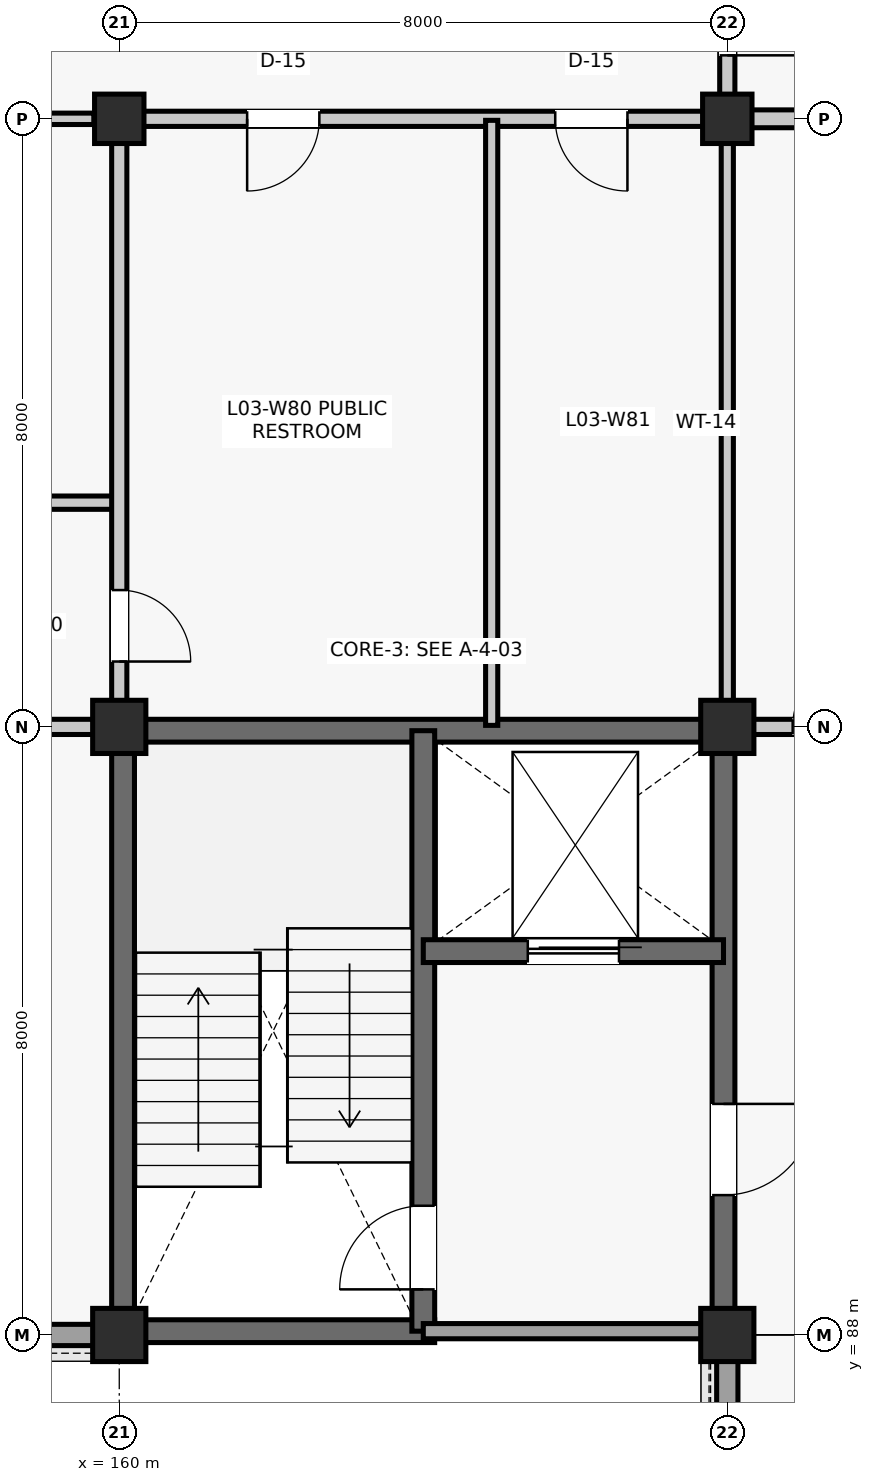
"""IFC4 building model, lengths in metres.
Left out: names, types, materials, properties, quantities, classifications, styles, units other than length and angle.
Written with IfcOpenShell. Run it as: python <this file> out.ifc"""

import sys

from ifc_helpers import new_model, si_unit, direction, frame, frame_2d, origin, origin_2d, place, context, subcontext, project, spatial, rectangle, extrude, element, fill, save


model = new_model("IFC4")
c1 = context("Model", 3, precision=1e-05, world=origin(), true_north=direction((0.0, 1.0)))
c2 = subcontext(c1, "Body", "Model", "MODEL_VIEW")
j1 = project(units=[si_unit("LENGTHUNIT", "METRE"), si_unit("PLANEANGLEUNIT", "RADIAN")], contexts=[c1])
p1 = place(None, origin())
s1 = spatial("IfcSite", under=j1, at=p1, CompositionType="ELEMENT")
p2 = place(p1, origin())
s2 = spatial("IfcBuilding", under=s1, at=p2, CompositionType="ELEMENT")
p3 = place(p2, frame((0.0, 0.0, 13.86)))
s3 = spatial("IfcBuildingStorey", under=s2, at=p3, CompositionType="ELEMENT", Elevation=13.86)
for number, where, z_axis, x_axis in (
    (1, (160.0, 88.0, 0.0), (0.0, 0.0, 1.0), (1.0, 0.0, 0.0)),
    (2, (160.0, 96.0, 0.0), (0.0, 0.0, 1.0), (1.0, 0.0, 0.0)),
):
    element("IfcColumn", number, at=place(p3, frame(where, z_axis=z_axis, x_axis=x_axis)), inside=s3, PredefinedType="COLUMN", context=c2, shape_type="SweptSolid", body=[
        extrude(rectangle(XDim=0.7, YDim=0.7, at=origin_2d()), origin(), (0.0, 0.0, 1.0), 3.96),
    ])
p4 = place(p3, frame((160.0, 104.0, 0.0), z_axis=(0.0, 0.0, 1.0), x_axis=(1.0, 0.0, 0.0)))
e3 = element("IfcColumn", 3, at=p4, inside=s3, PredefinedType="COLUMN", context=c2, shape_type="SweptSolid", body=[
    extrude(rectangle(XDim=0.65, YDim=0.65, at=origin_2d()), origin(), (0.0, 0.0, 1.0), 3.96),
])
for number, where, z_axis, x_axis in (
    (4, (168.0, 88.0, 0.0), (0.0, 0.0, 1.0), (1.0, 0.0, 0.0)),
    (5, (168.0, 96.0, 0.0), (0.0, 0.0, 1.0), (1.0, 0.0, 0.0)),
):
    element("IfcColumn", number, at=place(p3, frame(where, z_axis=z_axis, x_axis=x_axis)), inside=s3, PredefinedType="COLUMN", context=c2, shape_type="SweptSolid", body=[
        extrude(rectangle(XDim=0.7, YDim=0.7, at=origin_2d()), origin(), (0.0, 0.0, 1.0), 3.96),
    ])
p5 = place(p3, frame((168.0, 104.0, 0.0), z_axis=(0.0, 0.0, 1.0), x_axis=(1.0, 0.0, 0.0)))
e6 = element("IfcColumn", 6, at=p5, inside=s3, PredefinedType="COLUMN", context=c2, shape_type="SweptSolid", body=[
    extrude(rectangle(XDim=0.65, YDim=0.65, at=origin_2d()), origin(), (0.0, 0.0, 1.0), 3.96),
])
p6 = place(p3, frame((152.31, 88.0, 0.0), z_axis=(0.0, 0.0, 1.0), x_axis=(1.0, 0.0, 0.0)))
e7 = element("IfcWall", 7, at=p6, inside=s3, PredefinedType="SOLIDWALL", context=c2, shape_type="SweptSolid", body=[
    extrude(rectangle(XDim=7.355, YDim=0.28, at=frame_2d((3.677, 0.0))), origin(), (0.0, 0.0, 1.0), 3.364),
])
p7 = place(p6, frame((2.577, 0.0, 1.35)))
e8 = element("IfcOpeningElement", 8, at=p7, cuts=e7, PredefinedType="OPENING", context=c2, shape_type="SweptSolid", body=[
    extrude(rectangle(XDim=2.2, YDim=1.3, at=frame_2d((1.1, 0.65))), frame((0.0, 0.15, 0.0), z_axis=(0.0, -1.0, 0.0), x_axis=(1.0, 0.0, 0.0)), (0.0, 0.0, 1.0), 0.3),
])
p8 = place(p3, frame((168.0, 80.31, 0.0), z_axis=(0.0, 0.0, 1.0), x_axis=(0.0, 1.0, 0.0)))
e9 = element("IfcWall", 9, at=p8, inside=s3, PredefinedType="SOLIDWALL", context=c2, shape_type="SweptSolid", body=[
    extrude(rectangle(XDim=7.355, YDim=0.28, at=frame_2d((3.677, 0.0))), origin(), (0.0, 0.0, 1.0), 3.304),
])
p9 = place(p8, frame((0.749, 0.0, 0.95)))
e10 = element("IfcOpeningElement", 10, at=p9, cuts=e9, PredefinedType="OPENING", context=c2, shape_type="SweptSolid", body=[
    extrude(rectangle(XDim=1.15, YDim=1.65, at=frame_2d((0.575, 0.825))), frame((0.0, 0.15, 0.0), z_axis=(0.0, -1.0, 0.0), x_axis=(1.0, 0.0, 0.0)), (0.0, 0.0, 1.0), 0.3),
])
p10 = place(p8, frame((5.456, 0.0, 0.95)))
e11 = element("IfcOpeningElement", 11, at=p10, cuts=e9, PredefinedType="OPENING", context=c2, shape_type="SweptSolid", body=[
    extrude(rectangle(XDim=1.15, YDim=1.65, at=frame_2d((0.575, 0.825))), frame((0.0, 0.15, 0.0), z_axis=(0.0, -1.0, 0.0), x_axis=(1.0, 0.0, 0.0)), (0.0, 0.0, 1.0), 0.3),
])
for number, where, z_axis, x_axis in (
    (12, (160.05, 88.24, 0.0), (0.0, 0.0, 1.0), (0.0, 1.0, 0.0)),
    (13, (160.24, 95.95, 0.0), (0.0, 0.0, 1.0), (1.0, 0.0, 0.0)),
):
    element("IfcWall", number, at=place(p3, frame(where, z_axis=z_axis, x_axis=x_axis)), inside=s3, PredefinedType="SHEAR", context=c2, shape_type="SweptSolid", body=[
        extrude(rectangle(XDim=7.52, YDim=0.3, at=frame_2d((3.76, 0.0))), origin(), (0.0, 0.0, 1.0), 3.725),
    ])
p11 = place(p3, frame((167.95, 88.24, 0.0), z_axis=(0.0, 0.0, 1.0), x_axis=(0.0, 1.0, 0.0)))
e14 = element("IfcWall", 14, at=p11, inside=s3, PredefinedType="SHEAR", context=c2, shape_type="SweptSolid", body=[
    extrude(rectangle(XDim=7.52, YDim=0.3, at=frame_2d((3.76, 0.0))), origin(), (0.0, 0.0, 1.0), 3.725),
])
p12 = place(p11, frame((1.6, 0.0, 0.0)))
e15 = element("IfcOpeningElement", 15, at=p12, cuts=e14, PredefinedType="OPENING", context=c2, shape_type="SweptSolid", body=[
    extrude(rectangle(XDim=1.2, YDim=2.15, at=frame_2d((0.6, 1.075))), frame((0.0, 0.16, 0.0), z_axis=(0.0, -1.0, 0.0), x_axis=(1.0, 0.0, 0.0)), (0.0, 0.0, 1.0), 0.32),
])
p13 = place(p3, frame((160.24, 88.05, 0.0), z_axis=(0.0, 0.0, 1.0), x_axis=(1.0, 0.0, 0.0)))
e16 = element("IfcWall", 16, at=p13, inside=s3, PredefinedType="SHEAR", context=c2, shape_type="SweptSolid", body=[
    extrude(rectangle(XDim=3.91, YDim=0.3, at=frame_2d((1.955, 0.0))), origin(), (0.0, 0.0, 1.0), 3.725),
])
p14 = place(p3, frame((164.0, 88.05, 0.0), z_axis=(0.0, 0.0, 1.0), x_axis=(0.0, 1.0, 0.0)))
e17 = element("IfcWall", 17, at=p14, inside=s3, PredefinedType="SHEAR", context=c2, shape_type="SweptSolid", body=[
    extrude(rectangle(XDim=7.9, YDim=0.3, at=frame_2d((3.95, 0.0))), origin(), (0.0, 0.0, 1.0), 3.725),
])
p15 = place(p14, frame((0.55, 0.0, 0.0)))
e18 = element("IfcOpeningElement", 18, at=p15, cuts=e17, PredefinedType="OPENING", context=c2, shape_type="SweptSolid", body=[
    extrude(rectangle(XDim=1.1, YDim=2.15, at=frame_2d((0.55, 1.075))), frame((0.0, 0.16, 0.0), z_axis=(0.0, -1.0, 0.0), x_axis=(1.0, 0.0, 0.0)), (0.0, 0.0, 1.0), 0.32),
])
p16 = place(p3, frame((164.0, 93.05, 0.0), z_axis=(0.0, 0.0, 1.0), x_axis=(1.0, 0.0, 0.0)))
e19 = element("IfcWall", 19, at=p16, inside=s3, PredefinedType="SHEAR", context=c2, shape_type="SweptSolid", body=[
    extrude(rectangle(XDim=3.95, YDim=0.3, at=frame_2d((1.975, 0.0))), origin(), (0.0, 0.0, 1.0), 3.725),
])
p17 = place(p16, frame((1.375, 0.0, 0.0)))
e20 = element("IfcOpeningElement", 20, at=p17, cuts=e19, PredefinedType="OPENING", context=c2, shape_type="SweptSolid", body=[
    extrude(rectangle(XDim=1.2, YDim=2.2, at=frame_2d((0.6, 1.1))), frame((0.0, 0.16, 0.0), z_axis=(0.0, -1.0, 0.0), x_axis=(1.0, 0.0, 0.0)), (0.0, 0.0, 1.0), 0.32),
])
p18 = place(p3, frame((164.0, 88.05, 0.0), z_axis=(0.0, 0.0, 1.0), x_axis=(1.0, 0.0, 0.0)))
e21 = element("IfcWall", 21, at=p18, inside=s3, PredefinedType="PARTITIONING", context=c2, shape_type="SweptSolid", body=[
    extrude(rectangle(XDim=3.66, YDim=0.2, at=frame_2d((1.83, 0.0))), origin(), (0.0, 0.0, 1.0), 3.297),
])
p19 = place(p3, frame((154.9, 98.95, 0.0), z_axis=(0.0, 0.0, 1.0), x_axis=(1.0, 0.0, 0.0)))
e22 = element("IfcWall", 22, at=p19, inside=s3, PredefinedType="PARTITIONING", context=c2, shape_type="SweptSolid", body=[
    extrude(rectangle(XDim=5.08, YDim=0.175, at=frame_2d((2.54, 0.0))), origin(), (0.0, 0.0, 1.0), 3.452),
])
p20 = place(p19, frame((2.03, 0.0, 0.0)))
e23 = element("IfcOpeningElement", 23, at=p20, cuts=e22, PredefinedType="OPENING", context=c2, shape_type="SweptSolid", body=[
    extrude(rectangle(XDim=1.02, YDim=2.2, at=frame_2d((0.51, 1.1))), frame((0.0, 0.097, 0.0), z_axis=(0.0, -1.0, 0.0), x_axis=(1.0, 0.0, 0.0)), (0.0, 0.0, 1.0), 0.195),
])
p21 = place(p3, frame((154.95, 104.0, 0.0), z_axis=(0.0, 0.0, 1.0), x_axis=(1.0, 0.0, 0.0)))
e24 = element("IfcWall", 24, at=p21, inside=s3, PredefinedType="PARTITIONING", context=c2, shape_type="SweptSolid", body=[
    extrude(rectangle(XDim=4.715, YDim=0.15, at=frame_2d((2.357, 0.0))), origin(), (0.0, 0.0, 1.0), 3.247),
])
p22 = place(p3, frame((152.315, 96.0, 0.0), z_axis=(0.0, 0.0, 1.0), x_axis=(1.0, 0.0, 0.0)))
e25 = element("IfcWall", 25, at=p22, inside=s3, PredefinedType="PARTITIONING", context=c2, shape_type="SweptSolid", body=[
    extrude(rectangle(XDim=7.345, YDim=0.2, at=frame_2d((3.672, 0.0))), origin(), (0.0, 0.0, 1.0), 3.452),
])
p23 = place(p3, frame((160.0, 96.34, 0.0), z_axis=(0.0, 0.0, 1.0), x_axis=(0.0, 1.0, 0.0)))
e26 = element("IfcWall", 26, at=p23, inside=s3, PredefinedType="PARTITIONING", context=c2, shape_type="SweptSolid", body=[
    extrude(rectangle(XDim=7.345, YDim=0.2, at=frame_2d((3.672, 0.0))), origin(), (0.0, 0.0, 1.0), 3.452),
])
p24 = place(p23, frame((0.52, 0.0, 0.0)))
e27 = element("IfcOpeningElement", 27, at=p24, cuts=e26, PredefinedType="OPENING", context=c2, shape_type="SweptSolid", body=[
    extrude(rectangle(XDim=0.94, YDim=2.12, at=frame_2d((0.47, 1.06))), frame((0.0, 0.11, 0.0), z_axis=(0.0, -1.0, 0.0), x_axis=(1.0, 0.0, 0.0)), (0.0, 0.0, 1.0), 0.22),
])
p25 = place(p3, frame((168.0, 96.34, 0.0), z_axis=(0.0, 0.0, 1.0), x_axis=(0.0, 1.0, 0.0)))
e28 = element("IfcWall", 28, at=p25, inside=s3, PredefinedType="PARTITIONING", context=c2, shape_type="SweptSolid", body=[
    extrude(rectangle(XDim=7.345, YDim=0.16, at=frame_2d((3.672, 0.0))), origin(), (0.0, 0.0, 1.0), 3.247),
])
p26 = place(p3, frame((160.315, 104.0, 0.0), z_axis=(0.0, 0.0, 1.0), x_axis=(1.0, 0.0, 0.0)))
e29 = element("IfcWall", 29, at=p26, inside=s3, PredefinedType="PARTITIONING", context=c2, shape_type="SweptSolid", body=[
    extrude(rectangle(XDim=7.37, YDim=0.2, at=frame_2d((3.685, 0.0))), origin(), (0.0, 0.0, 1.0), 3.253),
])
p27 = place(p26, frame((1.367, 0.0, 0.0)))
e30 = element("IfcOpeningElement", 30, at=p27, cuts=e29, PredefinedType="OPENING", context=c2, shape_type="SweptSolid", body=[
    extrude(rectangle(XDim=0.95, YDim=2.1, at=frame_2d((0.475, 1.05))), frame((0.0, 0.11, 0.0), z_axis=(0.0, -1.0, 0.0), x_axis=(1.0, 0.0, 0.0)), (0.0, 0.0, 1.0), 0.22),
])
p28 = place(p26, frame((5.421, 0.0, 0.0)))
e31 = element("IfcOpeningElement", 31, at=p28, cuts=e29, PredefinedType="OPENING", context=c2, shape_type="SweptSolid", body=[
    extrude(rectangle(XDim=0.95, YDim=2.1, at=frame_2d((0.475, 1.05))), frame((0.0, 0.11, 0.0), z_axis=(0.0, -1.0, 0.0), x_axis=(1.0, 0.0, 0.0)), (0.0, 0.0, 1.0), 0.22),
])
p29 = place(p3, frame((168.0, 104.315, 0.0), z_axis=(0.0, 0.0, 1.0), x_axis=(0.0, 1.0, 0.0)))
e32 = element("IfcWall", 32, at=p29, inside=s3, PredefinedType="PARTITIONING", context=c2, shape_type="SweptSolid", body=[
    extrude(rectangle(XDim=7.37, YDim=0.2, at=frame_2d((3.685, 0.0))), origin(), (0.0, 0.0, 1.0), 3.253),
])
p30 = place(p29, frame((0.52, 0.0, 0.0)))
e33 = element("IfcOpeningElement", 33, at=p30, cuts=e32, PredefinedType="OPENING", context=c2, shape_type="SweptSolid", body=[
    extrude(rectangle(XDim=0.94, YDim=2.12, at=frame_2d((0.47, 1.06))), frame((0.0, 0.11, 0.0), z_axis=(0.0, -1.0, 0.0), x_axis=(1.0, 0.0, 0.0)), (0.0, 0.0, 1.0), 0.22),
])
p31 = place(p3, frame((168.34, 96.0, 0.0), z_axis=(0.0, 0.0, 1.0), x_axis=(1.0, 0.0, 0.0)))
e34 = element("IfcWall", 34, at=p31, inside=s3, PredefinedType="PARTITIONING", context=c2, shape_type="SweptSolid", body=[
    extrude(rectangle(XDim=7.345, YDim=0.2, at=frame_2d((3.672, 0.0))), origin(), (0.0, 0.0, 1.0), 3.253),
])
p32 = place(p31, frame((0.52, 0.0, 0.0)))
e35 = element("IfcOpeningElement", 35, at=p32, cuts=e34, PredefinedType="OPENING", context=c2, shape_type="SweptSolid", body=[
    extrude(rectangle(XDim=0.94, YDim=2.12, at=frame_2d((0.47, 1.06))), frame((0.0, 0.11, 0.0), z_axis=(0.0, -1.0, 0.0), x_axis=(1.0, 0.0, 0.0)), (0.0, 0.0, 1.0), 0.22),
])
p33 = place(p3, frame((168.315, 104.0, 0.0), z_axis=(0.0, 0.0, 1.0), x_axis=(1.0, 0.0, 0.0)))
e36 = element("IfcWall", 36, at=p33, inside=s3, PredefinedType="PARTITIONING", context=c2, shape_type="SweptSolid", body=[
    extrude(rectangle(XDim=7.37, YDim=0.235, at=frame_2d((3.685, 0.0))), origin(), (0.0, 0.0, 1.0), 3.241),
])
p34 = place(p3, frame((164.9, 96.02, 0.0), z_axis=(0.0, 0.0, 1.0), x_axis=(0.0, 1.0, 0.0)))
e37 = element("IfcWall", 37, at=p34, inside=s3, PredefinedType="PARTITIONING", context=c2, shape_type="SweptSolid", body=[
    extrude(rectangle(XDim=7.96, YDim=0.16, at=frame_2d((3.98, 0.0))), origin(), (0.0, 0.0, 1.0), 3.247),
])
p35 = place(p15, origin())
e38 = element("IfcDoor", 38, at=p35, inside=s3, OperationType="SINGLE_SWING_LEFT", PredefinedType="DOOR", context=c2, shape_type="SweptSolid", body=[
    extrude(rectangle(XDim=1.1, YDim=2.15, at=frame_2d((0.55, 1.075))), frame((0.0, 0.025, 0.0), z_axis=(0.0, -1.0, 0.0), x_axis=(1.0, 0.0, 0.0)), (0.0, 0.0, 1.0), 0.05),
])
fill(e18, e38)
p36 = place(p17, origin())
e39 = element("IfcDoor", 39, at=p36, inside=s3, OperationType="SLIDING_TO_LEFT", PredefinedType="DOOR", context=c2, shape_type="SweptSolid", body=[
    extrude(rectangle(XDim=1.2, YDim=2.2, at=frame_2d((0.6, 1.1))), frame((0.0, 0.025, 0.0), z_axis=(0.0, -1.0, 0.0), x_axis=(1.0, 0.0, 0.0)), (0.0, 0.0, 1.0), 0.05),
])
fill(e20, e39)
p37 = place(p12, frame((1.2, 0.0, 0.0), z_axis=(0.0, 0.0, 1.0), x_axis=(-1.0, 0.0, 0.0)))
e40 = element("IfcDoor", 40, at=p37, inside=s3, OperationType="SINGLE_SWING_RIGHT", PredefinedType="DOOR", context=c2, shape_type="SweptSolid", body=[
    extrude(rectangle(XDim=1.2, YDim=2.15, at=frame_2d((0.6, 1.075))), frame((0.0, 0.025, 0.0), z_axis=(0.0, -1.0, 0.0), x_axis=(1.0, 0.0, 0.0)), (0.0, 0.0, 1.0), 0.05),
])
fill(e15, e40)
p38 = place(p24, frame((0.94, 0.0, 0.0), z_axis=(0.0, 0.0, 1.0), x_axis=(-1.0, 0.0, 0.0)))
e41 = element("IfcDoor", 41, at=p38, inside=s3, OperationType="SINGLE_SWING_LEFT", PredefinedType="DOOR", context=c2, shape_type="SweptSolid", body=[
    extrude(rectangle(XDim=0.94, YDim=2.12, at=frame_2d((0.47, 1.06))), frame((0.0, 0.025, 0.0), z_axis=(0.0, -1.0, 0.0), x_axis=(1.0, 0.0, 0.0)), (0.0, 0.0, 1.0), 0.05),
])
fill(e27, e41)
p39 = place(p27, frame((0.95, 0.0, 0.0), z_axis=(0.0, 0.0, 1.0), x_axis=(-1.0, 0.0, 0.0)))
e42 = element("IfcDoor", 42, at=p39, inside=s3, OperationType="SINGLE_SWING_LEFT", PredefinedType="DOOR", context=c2, shape_type="SweptSolid", body=[
    extrude(rectangle(XDim=0.95, YDim=2.1, at=frame_2d((0.475, 1.05))), frame((0.0, 0.025, 0.0), z_axis=(0.0, -1.0, 0.0), x_axis=(1.0, 0.0, 0.0)), (0.0, 0.0, 1.0), 0.05),
])
fill(e30, e42)
p40 = place(p28, frame((0.95, 0.0, 0.0), z_axis=(0.0, 0.0, 1.0), x_axis=(-1.0, 0.0, 0.0)))
e43 = element("IfcDoor", 43, at=p40, inside=s3, OperationType="SINGLE_SWING_RIGHT", PredefinedType="DOOR", context=c2, shape_type="SweptSolid", body=[
    extrude(rectangle(XDim=0.95, YDim=2.1, at=frame_2d((0.475, 1.05))), frame((0.0, 0.025, 0.0), z_axis=(0.0, -1.0, 0.0), x_axis=(1.0, 0.0, 0.0)), (0.0, 0.0, 1.0), 0.05),
])
fill(e31, e43)
p41 = place(p30, frame((0.94, 0.0, 0.0), z_axis=(0.0, 0.0, 1.0), x_axis=(-1.0, 0.0, 0.0)))
e44 = element("IfcDoor", 44, at=p41, inside=s3, OperationType="SINGLE_SWING_LEFT", PredefinedType="DOOR", context=c2, shape_type="SweptSolid", body=[
    extrude(rectangle(XDim=0.94, YDim=2.12, at=frame_2d((0.47, 1.06))), frame((0.0, 0.025, 0.0), z_axis=(0.0, -1.0, 0.0), x_axis=(1.0, 0.0, 0.0)), (0.0, 0.0, 1.0), 0.05),
])
fill(e33, e44)
p42 = place(p32, origin())
e45 = element("IfcDoor", 45, at=p42, inside=s3, OperationType="SINGLE_SWING_RIGHT", PredefinedType="DOOR", context=c2, shape_type="SweptSolid", body=[
    extrude(rectangle(XDim=0.94, YDim=2.12, at=frame_2d((0.47, 1.06))), frame((0.0, 0.025, 0.0), z_axis=(0.0, -1.0, 0.0), x_axis=(1.0, 0.0, 0.0)), (0.0, 0.0, 1.0), 0.05),
])
fill(e35, e45)
save(model, sys.argv[1])
